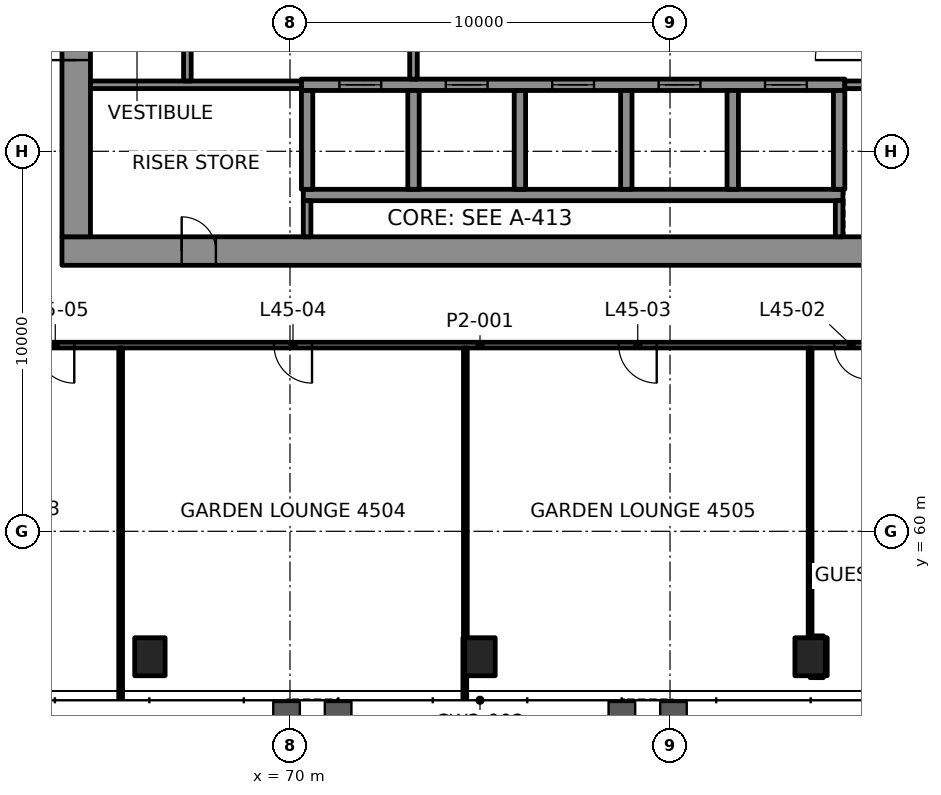
"""IFC4 building model, lengths in metres.
Left out: names, types, materials, properties, quantities, classifications, styles, units other than length and angle.
Written with IfcOpenShell. Run it as: python <this file> out.ifc"""

import sys

from ifc_helpers import new_model, si_unit, direction, frame, frame_2d, origin, origin_2d, place, context, subcontext, project, spatial, rectangle, hollow_rectangle, extrude, element, fill, save


model = new_model("IFC4")
c1 = context("Model", 3, precision=1e-05, world=origin(), true_north=direction((0.0, 1.0)))
c2 = subcontext(c1, "Body", "Model", "MODEL_VIEW")
j1 = project(units=[si_unit("LENGTHUNIT", "METRE"), si_unit("PLANEANGLEUNIT", "RADIAN")], contexts=[c1])
p1 = place(None, origin())
s1 = spatial("IfcSite", under=j1, at=p1, CompositionType="ELEMENT")
p2 = place(p1, origin())
s2 = spatial("IfcBuilding", under=s1, at=p2, CompositionType="ELEMENT")
p3 = place(p2, frame((0.0, 0.0, 194.8)))
s3 = spatial("IfcBuildingStorey", under=s2, at=p3, CompositionType="ELEMENT", Elevation=194.8)
for number, where, z_axis, x_axis in (
    (1, (66.314, 56.699, -0.0), (0.0, 0.0, 1.0), (1.0, 0.0, 0.0)),
    (2, (75.0, 56.699, -0.0), (0.0, 0.0, 1.0), (1.0, 0.0, 0.0)),
    (3, (83.686, 56.699, -0.0), (0.0, 0.0, 1.0), (1.0, 0.0, 0.0)),
):
    element("IfcColumn", number, at=place(p3, frame(where, z_axis=z_axis, x_axis=x_axis)), inside=s3, PredefinedType="COLUMN", context=c2, shape_type="SweptSolid", body=[
        extrude(hollow_rectangle(XDim=0.8, YDim=1.0, WallThickness=0.05, at=origin_2d()), origin(), (0.0, 0.0, 1.0), 3.9),
    ])
p4 = place(p3, frame((64.0, 67.375, 0.0), z_axis=(0.0, 0.0, 1.0), x_axis=(1.0, 0.0, 0.0)))
e4 = element("IfcWall", 4, at=p4, inside=s3, PredefinedType="SHEAR", context=c2, shape_type="SweptSolid", body=[
    extrude(rectangle(XDim=22.0, YDim=0.75, at=frame_2d((11.0, 0.0))), origin(), (0.0, 0.0, 1.0), 3.7),
])
p5 = place(p4, frame((3.15, 0.0, 0.0)))
e5 = element("IfcOpeningElement", 5, at=p5, cuts=e4, PredefinedType="OPENING", context=c2, shape_type="SweptSolid", body=[
    extrude(rectangle(XDim=0.9, YDim=2.1, at=frame_2d((0.45, 1.05))), frame((0.0, 0.385, 0.0), z_axis=(0.0, -1.0, 0.0), x_axis=(1.0, 0.0, 0.0)), (0.0, 0.0, 1.0), 0.77),
])
p6 = place(p3, frame((64.375, 67.75, 0.0), z_axis=(0.0, 0.0, 1.0), x_axis=(0.0, 1.0, 0.0)))
e6 = element("IfcWall", 6, at=p6, inside=s3, PredefinedType="SHEAR", context=c2, shape_type="SweptSolid", body=[
    extrude(rectangle(XDim=14.5, YDim=0.75, at=frame_2d((7.25, 0.0))), origin(), (0.0, 0.0, 1.0), 3.7),
])
p7 = place(p6, frame((4.65, 0.0, 0.0)))
e7 = element("IfcOpeningElement", 7, at=p7, cuts=e6, PredefinedType="OPENING", context=c2, shape_type="SweptSolid", body=[
    extrude(rectangle(XDim=1.8, YDim=2.1, at=frame_2d((0.9, 1.05))), frame((0.0, 0.385, 0.0), z_axis=(0.0, -1.0, 0.0), x_axis=(1.0, 0.0, 0.0)), (0.0, 0.0, 1.0), 0.77),
])
p8 = place(p6, frame((8.5, 0.0, 0.0)))
e8 = element("IfcOpeningElement", 8, at=p8, cuts=e6, PredefinedType="OPENING", context=c2, shape_type="SweptSolid", body=[
    extrude(rectangle(XDim=0.9, YDim=2.1, at=frame_2d((0.45, 1.05))), frame((0.0, 0.385, 0.0), z_axis=(0.0, -1.0, 0.0), x_axis=(1.0, 0.0, 0.0)), (0.0, 0.0, 1.0), 0.77),
])
p9 = place(p6, frame((12.2, 0.0, 0.0)))
e9 = element("IfcOpeningElement", 9, at=p9, cuts=e6, PredefinedType="OPENING", context=c2, shape_type="SweptSolid", body=[
    extrude(rectangle(XDim=0.9, YDim=2.1, at=frame_2d((0.45, 1.05))), frame((0.0, 0.385, 0.0), z_axis=(0.0, -1.0, 0.0), x_axis=(1.0, 0.0, 0.0)), (0.0, 0.0, 1.0), 0.77),
])
p10 = place(p3, frame((70.35, 68.85, 0.0), z_axis=(0.0, 0.0, 1.0), x_axis=(1.0, 0.0, 0.0)))
e10 = element("IfcWall", 10, at=p10, inside=s3, PredefinedType="SHEAR", context=c2, shape_type="SweptSolid", body=[
    extrude(rectangle(XDim=14.2, YDim=0.3, at=frame_2d((7.1, 0.0))), origin(), (0.0, 0.0, 1.0), 3.7),
])
p11 = place(p3, frame((70.3, 71.75, 0.0), z_axis=(0.0, 0.0, 1.0), x_axis=(1.0, 0.0, 0.0)))
e11 = element("IfcWall", 11, at=p11, inside=s3, PredefinedType="SHEAR", context=c2, shape_type="SweptSolid", body=[
    extrude(rectangle(XDim=14.3, YDim=0.3, at=frame_2d((7.15, 0.0))), origin(), (0.0, 0.0, 1.0), 3.7),
])
p12 = place(p11, frame((1.0, 0.0, 0.0)))
e12 = element("IfcOpeningElement", 12, at=p12, cuts=e11, PredefinedType="OPENING", context=c2, shape_type="SweptSolid", body=[
    extrude(rectangle(XDim=1.1, YDim=2.1, at=frame_2d((0.55, 1.05))), frame((0.0, 0.16, 0.0), z_axis=(0.0, -1.0, 0.0), x_axis=(1.0, 0.0, 0.0)), (0.0, 0.0, 1.0), 0.32),
])
p13 = place(p11, frame((3.8, 0.0, 0.0)))
e13 = element("IfcOpeningElement", 13, at=p13, cuts=e11, PredefinedType="OPENING", context=c2, shape_type="SweptSolid", body=[
    extrude(rectangle(XDim=1.1, YDim=2.1, at=frame_2d((0.55, 1.05))), frame((0.0, 0.16, 0.0), z_axis=(0.0, -1.0, 0.0), x_axis=(1.0, 0.0, 0.0)), (0.0, 0.0, 1.0), 0.32),
])
p14 = place(p11, frame((6.6, 0.0, 0.0)))
e14 = element("IfcOpeningElement", 14, at=p14, cuts=e11, PredefinedType="OPENING", context=c2, shape_type="SweptSolid", body=[
    extrude(rectangle(XDim=1.1, YDim=2.1, at=frame_2d((0.55, 1.05))), frame((0.0, 0.16, 0.0), z_axis=(0.0, -1.0, 0.0), x_axis=(1.0, 0.0, 0.0)), (0.0, 0.0, 1.0), 0.32),
])
p15 = place(p11, frame((9.4, 0.0, 0.0)))
e15 = element("IfcOpeningElement", 15, at=p15, cuts=e11, PredefinedType="OPENING", context=c2, shape_type="SweptSolid", body=[
    extrude(rectangle(XDim=1.1, YDim=2.1, at=frame_2d((0.55, 1.05))), frame((0.0, 0.16, 0.0), z_axis=(0.0, -1.0, 0.0), x_axis=(1.0, 0.0, 0.0)), (0.0, 0.0, 1.0), 0.32),
])
p16 = place(p11, frame((12.2, 0.0, 0.0)))
e16 = element("IfcOpeningElement", 16, at=p16, cuts=e11, PredefinedType="OPENING", context=c2, shape_type="SweptSolid", body=[
    extrude(rectangle(XDim=1.1, YDim=2.1, at=frame_2d((0.55, 1.05))), frame((0.0, 0.16, 0.0), z_axis=(0.0, -1.0, 0.0), x_axis=(1.0, 0.0, 0.0)), (0.0, 0.0, 1.0), 0.32),
])
for number, where, z_axis, x_axis in (
    (17, (70.45, 69.0, 0.0), (0.0, 0.0, 1.0), (0.0, 1.0, 0.0)),
    (18, (73.25, 69.0, 0.0), (0.0, 0.0, 1.0), (0.0, 1.0, 0.0)),
    (19, (76.05, 69.0, 0.0), (0.0, 0.0, 1.0), (0.0, 1.0, 0.0)),
    (20, (78.85, 69.0, 0.0), (0.0, 0.0, 1.0), (0.0, 1.0, 0.0)),
    (21, (81.65, 69.0, 0.0), (0.0, 0.0, 1.0), (0.0, 1.0, 0.0)),
    (22, (84.45, 69.0, 0.0), (0.0, 0.0, 1.0), (0.0, 1.0, 0.0)),
):
    element("IfcWall", number, at=place(p3, frame(where, z_axis=z_axis, x_axis=x_axis)), inside=s3, PredefinedType="SHEAR", context=c2, shape_type="SweptSolid", body=[
        extrude(rectangle(XDim=2.6, YDim=0.3, at=frame_2d((1.3, 0.0))), origin(), (0.0, 0.0, 1.0), 3.7),
    ])
p17 = place(p3, frame((83.686, 56.199, 0.0), z_axis=(0.0, 0.0, 1.0), x_axis=(1.0, 0.0, 0.0)))
e23 = element("IfcWall", 23, at=p17, inside=s3, PredefinedType="PARTITIONING", context=c2, shape_type="SweptSolid", body=[
    extrude(rectangle(XDim=0.35, YDim=0.1, at=frame_2d((0.175, 0.0))), origin(), (0.0, 0.0, 1.0), 3.1),
])
p18 = place(p3, frame((83.746, 57.199, 0.0), z_axis=(0.0, 0.0, 1.0), x_axis=(1.0, 0.0, 0.0)))
e24 = element("IfcWall", 24, at=p18, inside=s3, PredefinedType="PARTITIONING", context=c2, shape_type="SweptSolid", body=[
    extrude(rectangle(XDim=0.29, YDim=0.1, at=frame_2d((0.145, 0.0))), origin(), (0.0, 0.0, 1.0), 3.1),
])
p19 = place(p3, frame((88.1, 64.9, 0.0), z_axis=(0.0, 0.0, 1.0), x_axis=(-1.0, 0.0, 0.0)))
e25 = element("IfcWall", 25, at=p19, inside=s3, PredefinedType="PARTITIONING", context=c2, shape_type="SweptSolid", body=[
    extrude(rectangle(XDim=26.2, YDim=0.15, at=frame_2d((13.1, 0.0))), origin(), (0.0, 0.0, 1.0), 3.1),
])
p20 = place(p19, frame((0.773, 0.0, 0.0)))
e26 = element("IfcOpeningElement", 26, at=p20, cuts=e25, PredefinedType="OPENING", context=c2, shape_type="SweptSolid", body=[
    extrude(rectangle(XDim=0.9, YDim=2.1, at=frame_2d((0.45, 1.05))), frame((0.0, 0.085, 0.0), z_axis=(0.0, -1.0, 0.0), x_axis=(1.0, 0.0, 0.0)), (0.0, 0.0, 1.0), 0.17),
])
p21 = place(p19, frame((2.878, 0.0, 0.0)))
e27 = element("IfcOpeningElement", 27, at=p21, cuts=e25, PredefinedType="OPENING", context=c2, shape_type="SweptSolid", body=[
    extrude(rectangle(XDim=0.9, YDim=2.1, at=frame_2d((0.45, 1.05))), frame((0.0, 0.085, 0.0), z_axis=(0.0, -1.0, 0.0), x_axis=(1.0, 0.0, 0.0)), (0.0, 0.0, 1.0), 0.17),
])
p22 = place(p19, frame((8.45, 0.0, 0.0)))
e28 = element("IfcOpeningElement", 28, at=p22, cuts=e25, PredefinedType="OPENING", context=c2, shape_type="SweptSolid", body=[
    extrude(rectangle(XDim=1.0, YDim=2.1, at=frame_2d((0.5, 1.05))), frame((0.0, 0.085, 0.0), z_axis=(0.0, -1.0, 0.0), x_axis=(1.0, 0.0, 0.0)), (0.0, 0.0, 1.0), 0.17),
])
p23 = place(p19, frame((17.521, 0.0, 0.0)))
e29 = element("IfcOpeningElement", 29, at=p23, cuts=e25, PredefinedType="OPENING", context=c2, shape_type="SweptSolid", body=[
    extrude(rectangle(XDim=1.0, YDim=2.1, at=frame_2d((0.5, 1.05))), frame((0.0, 0.085, 0.0), z_axis=(0.0, -1.0, 0.0), x_axis=(1.0, 0.0, 0.0)), (0.0, 0.0, 1.0), 0.17),
])
p24 = place(p19, frame((23.776, 0.0, 0.0)))
e30 = element("IfcOpeningElement", 30, at=p24, cuts=e25, PredefinedType="OPENING", context=c2, shape_type="SweptSolid", body=[
    extrude(rectangle(XDim=1.0, YDim=2.1, at=frame_2d((0.5, 1.05))), frame((0.0, 0.085, 0.0), z_axis=(0.0, -1.0, 0.0), x_axis=(1.0, 0.0, 0.0)), (0.0, 0.0, 1.0), 0.17),
])
p25 = place(p3, frame((84.086, 56.199, 0.0), z_axis=(0.0, 0.0, 1.0), x_axis=(0.0, 1.0, 0.0)))
e31 = element("IfcWall", 31, at=p25, inside=s3, PredefinedType="PARTITIONING", context=c2, shape_type="SweptSolid", body=[
    extrude(rectangle(XDim=0.999, YDim=0.1, at=frame_2d((0.5, 0.0))), origin(), (0.0, 0.0, 1.0), 3.022),
])
p26 = place(p3, frame((83.686, 57.199, 0.0), z_axis=(0.0, 0.0, 1.0), x_axis=(0.0, 1.0, 0.0)))
e32 = element("IfcWall", 32, at=p26, inside=s3, PredefinedType="PARTITIONING", context=c2, shape_type="SweptSolid", body=[
    extrude(rectangle(XDim=7.626, YDim=0.1, at=frame_2d((3.813, 0.0))), origin(), (0.0, 0.0, 1.0), 3.1),
])
p27 = place(p3, frame((74.615, 57.199, 0.0), z_axis=(0.0, 0.0, 1.0), x_axis=(0.0, 1.0, 0.0)))
e33 = element("IfcWall", 33, at=p27, inside=s3, PredefinedType="PARTITIONING", context=c2, shape_type="SweptSolid", body=[
    extrude(rectangle(XDim=7.625, YDim=0.1, at=frame_2d((3.813, 0.0))), origin(), (0.0, 0.0, 1.0), 3.1),
])
p28 = place(p3, frame((74.6, 55.599, 0.0), z_axis=(0.0, 0.0, 1.0), x_axis=(0.0, 1.0, 0.0)))
e34 = element("IfcWall", 34, at=p28, inside=s3, PredefinedType="PARTITIONING", context=c2, shape_type="SweptSolid", body=[
    extrude(rectangle(XDim=1.599, YDim=0.1, at=frame_2d((0.8, 0.0))), origin(), (0.0, 0.0, 1.0), 3.022),
])
p29 = place(p3, frame((65.544, 55.599, 0.0), z_axis=(0.0, 0.0, 1.0), x_axis=(0.0, 1.0, 0.0)))
e35 = element("IfcWall", 35, at=p29, inside=s3, PredefinedType="PARTITIONING", context=c2, shape_type="SweptSolid", body=[
    extrude(rectangle(XDim=9.226, YDim=0.1, at=frame_2d((4.613, 0.0))), origin(), (0.0, 0.0, 1.0), 3.022),
])
p30 = place(p3, frame((64.75, 71.75, 0.0), z_axis=(0.0, 0.0, 1.0), x_axis=(1.0, 0.0, 0.0)))
e36 = element("IfcWall", 36, at=p30, inside=s3, PredefinedType="PARTITIONING", context=c2, shape_type="SweptSolid", body=[
    extrude(rectangle(XDim=5.55, YDim=0.2, at=frame_2d((2.775, 0.0))), origin(), (0.0, 0.0, 1.0), 3.7),
])
p31 = place(p3, frame((84.6, 71.75, 0.0), z_axis=(0.0, 0.0, 1.0), x_axis=(1.0, 0.0, 0.0)))
e37 = element("IfcWall", 37, at=p31, inside=s3, PredefinedType="PARTITIONING", context=c2, shape_type="SweptSolid", body=[
    extrude(rectangle(XDim=0.65, YDim=0.2, at=frame_2d((0.325, 0.0))), origin(), (0.0, 0.0, 1.0), 3.7),
])
p32 = place(p3, frame((67.3, 71.85, 0.0), z_axis=(0.0, 0.0, 1.0), x_axis=(0.0, 1.0, 0.0)))
e38 = element("IfcWall", 38, at=p32, inside=s3, PredefinedType="PARTITIONING", context=c2, shape_type="SweptSolid", body=[
    extrude(rectangle(XDim=5.75, YDim=0.2, at=frame_2d((2.875, 0.0))), origin(), (0.0, 0.0, 1.0), 3.7),
])
p33 = place(p32, frame((0.85, 0.0, 0.0)))
e39 = element("IfcOpeningElement", 39, at=p33, cuts=e38, PredefinedType="OPENING", context=c2, shape_type="SweptSolid", body=[
    extrude(rectangle(XDim=1.2, YDim=2.1, at=frame_2d((0.6, 1.05))), frame((0.0, 0.11, 0.0), z_axis=(0.0, -1.0, 0.0), x_axis=(1.0, 0.0, 0.0)), (0.0, 0.0, 1.0), 0.22),
])
p34 = place(p3, frame((70.45, 67.75, 0.0), z_axis=(0.0, 0.0, 1.0), x_axis=(0.0, 1.0, 0.0)))
e40 = element("IfcWall", 40, at=p34, inside=s3, PredefinedType="PARTITIONING", context=c2, shape_type="SweptSolid", body=[
    extrude(rectangle(XDim=0.95, YDim=0.2, at=frame_2d((0.475, 0.0))), origin(), (0.0, 0.0, 1.0), 3.7),
])
p35 = place(p3, frame((73.25, 71.9, 0.0), z_axis=(0.0, 0.0, 1.0), x_axis=(0.0, 1.0, 0.0)))
e41 = element("IfcWall", 41, at=p35, inside=s3, PredefinedType="PARTITIONING", context=c2, shape_type="SweptSolid", body=[
    extrude(rectangle(XDim=2.8, YDim=0.2, at=frame_2d((1.4, 0.0))), origin(), (0.0, 0.0, 1.0), 3.7),
])
p36 = place(p35, frame((0.8, 0.0, 0.0)))
e42 = element("IfcOpeningElement", 42, at=p36, cuts=e41, PredefinedType="OPENING", context=c2, shape_type="SweptSolid", body=[
    extrude(rectangle(XDim=1.2, YDim=2.1, at=frame_2d((0.6, 1.05))), frame((0.0, 0.11, 0.0), z_axis=(0.0, -1.0, 0.0), x_axis=(1.0, 0.0, 0.0)), (0.0, 0.0, 1.0), 0.22),
])
p37 = place(p3, frame((84.45, 67.75, 0.0), z_axis=(0.0, 0.0, 1.0), x_axis=(0.0, 1.0, 0.0)))
e43 = element("IfcWall", 43, at=p37, inside=s3, PredefinedType="PARTITIONING", context=c2, shape_type="SweptSolid", body=[
    extrude(rectangle(XDim=0.95, YDim=0.2, at=frame_2d((0.475, 0.0))), origin(), (0.0, 0.0, 1.0), 3.7),
])
p38 = place(p21, origin())
e44 = element("IfcDoor", 44, at=p38, inside=s3, OperationType="SINGLE_SWING_RIGHT", PredefinedType="DOOR", context=c2, shape_type="SweptSolid", body=[
    extrude(rectangle(XDim=0.9, YDim=2.1, at=frame_2d((0.45, 1.05))), frame((0.0, 0.025, 0.0), z_axis=(0.0, -1.0, 0.0), x_axis=(1.0, 0.0, 0.0)), (0.0, 0.0, 1.0), 0.05),
])
fill(e27, e44)
p39 = place(p22, origin())
e45 = element("IfcDoor", 45, at=p39, inside=s3, OperationType="SINGLE_SWING_LEFT", PredefinedType="DOOR", context=c2, shape_type="SweptSolid", body=[
    extrude(rectangle(XDim=1.0, YDim=2.1, at=frame_2d((0.5, 1.05))), frame((0.0, 0.025, 0.0), z_axis=(0.0, -1.0, 0.0), x_axis=(1.0, 0.0, 0.0)), (0.0, 0.0, 1.0), 0.05),
])
fill(e28, e45)
p40 = place(p23, origin())
e46 = element("IfcDoor", 46, at=p40, inside=s3, OperationType="SINGLE_SWING_RIGHT", PredefinedType="DOOR", context=c2, shape_type="SweptSolid", body=[
    extrude(rectangle(XDim=1.0, YDim=2.1, at=frame_2d((0.5, 1.05))), frame((0.0, 0.025, 0.0), z_axis=(0.0, -1.0, 0.0), x_axis=(1.0, 0.0, 0.0)), (0.0, 0.0, 1.0), 0.05),
])
fill(e29, e46)
p41 = place(p24, origin())
e47 = element("IfcDoor", 47, at=p41, inside=s3, OperationType="SINGLE_SWING_LEFT", PredefinedType="DOOR", context=c2, shape_type="SweptSolid", body=[
    extrude(rectangle(XDim=1.0, YDim=2.1, at=frame_2d((0.5, 1.05))), frame((0.0, 0.025, 0.0), z_axis=(0.0, -1.0, 0.0), x_axis=(1.0, 0.0, 0.0)), (0.0, 0.0, 1.0), 0.05),
])
fill(e30, e47)
p42 = place(p12, origin())
e48 = element("IfcDoor", 48, at=p42, inside=s3, OperationType="DOUBLE_DOOR_SLIDING", PredefinedType="DOOR", context=c2, shape_type="SweptSolid", body=[
    extrude(rectangle(XDim=1.1, YDim=2.1, at=frame_2d((0.55, 1.05))), frame((0.0, 0.025, 0.0), z_axis=(0.0, -1.0, 0.0), x_axis=(1.0, 0.0, 0.0)), (0.0, 0.0, 1.0), 0.05),
])
fill(e12, e48)
p43 = place(p13, origin())
e49 = element("IfcDoor", 49, at=p43, inside=s3, OperationType="DOUBLE_DOOR_SLIDING", PredefinedType="DOOR", context=c2, shape_type="SweptSolid", body=[
    extrude(rectangle(XDim=1.1, YDim=2.1, at=frame_2d((0.55, 1.05))), frame((0.0, 0.025, 0.0), z_axis=(0.0, -1.0, 0.0), x_axis=(1.0, 0.0, 0.0)), (0.0, 0.0, 1.0), 0.05),
])
fill(e13, e49)
p44 = place(p14, origin())
e50 = element("IfcDoor", 50, at=p44, inside=s3, OperationType="DOUBLE_DOOR_SLIDING", PredefinedType="DOOR", context=c2, shape_type="SweptSolid", body=[
    extrude(rectangle(XDim=1.1, YDim=2.1, at=frame_2d((0.55, 1.05))), frame((0.0, 0.025, 0.0), z_axis=(0.0, -1.0, 0.0), x_axis=(1.0, 0.0, 0.0)), (0.0, 0.0, 1.0), 0.05),
])
fill(e14, e50)
p45 = place(p15, origin())
e51 = element("IfcDoor", 51, at=p45, inside=s3, OperationType="DOUBLE_DOOR_SLIDING", PredefinedType="DOOR", context=c2, shape_type="SweptSolid", body=[
    extrude(rectangle(XDim=1.1, YDim=2.1, at=frame_2d((0.55, 1.05))), frame((0.0, 0.025, 0.0), z_axis=(0.0, -1.0, 0.0), x_axis=(1.0, 0.0, 0.0)), (0.0, 0.0, 1.0), 0.05),
])
fill(e15, e51)
p46 = place(p16, origin())
e52 = element("IfcDoor", 52, at=p46, inside=s3, OperationType="DOUBLE_DOOR_SLIDING", PredefinedType="DOOR", context=c2, shape_type="SweptSolid", body=[
    extrude(rectangle(XDim=1.1, YDim=2.1, at=frame_2d((0.55, 1.05))), frame((0.0, 0.025, 0.0), z_axis=(0.0, -1.0, 0.0), x_axis=(1.0, 0.0, 0.0)), (0.0, 0.0, 1.0), 0.05),
])
fill(e16, e52)
p47 = place(p7, origin())
e53 = element("IfcDoor", 53, at=p47, inside=s3, OperationType="SINGLE_SWING_LEFT", PredefinedType="DOOR", context=c2, shape_type="SweptSolid", body=[
    extrude(rectangle(XDim=1.8, YDim=2.1, at=frame_2d((0.9, 1.05))), frame((0.0, 0.095, 0.0), z_axis=(0.0, -1.0, 0.0), x_axis=(1.0, 0.0, 0.0)), (0.0, 0.0, 1.0), 0.19),
])
fill(e7, e53)
p48 = place(p5, origin())
e54 = element("IfcDoor", 54, at=p48, inside=s3, OperationType="SINGLE_SWING_LEFT", PredefinedType="DOOR", context=c2, shape_type="SweptSolid", body=[
    extrude(rectangle(XDim=0.9, YDim=2.1, at=frame_2d((0.45, 1.05))), frame((0.0, 0.095, 0.0), z_axis=(0.0, -1.0, 0.0), x_axis=(1.0, 0.0, 0.0)), (0.0, 0.0, 1.0), 0.19),
])
fill(e5, e54)
save(model, sys.argv[1])
